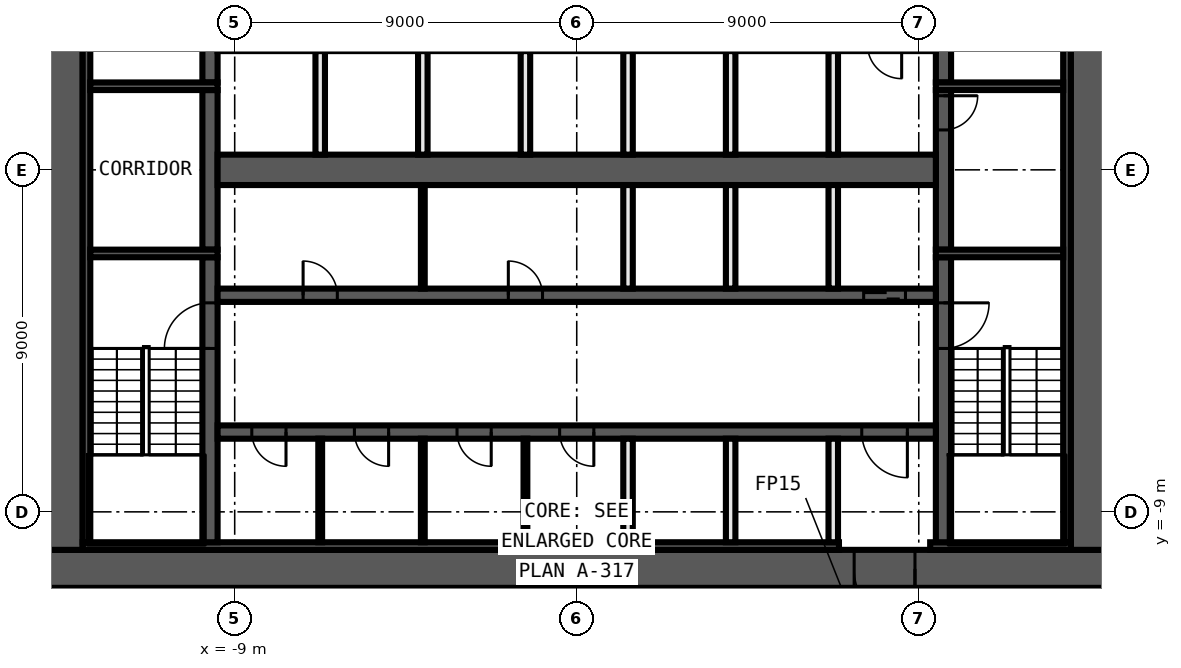
"""IFC4 building model, lengths in metres.
Left out: names, types, materials, properties, quantities, classifications, styles, units other than length and angle.
Written with IfcOpenShell. Run it as: python <this file> out.ifc"""

import sys

from ifc_helpers import new_model, si_unit, direction, frame, frame_2d, origin, place, context, subcontext, project, spatial, rectangle, extrude, element, fill, save


model = new_model("IFC4")
c1 = context("Model", 3, precision=1e-05, world=origin(), true_north=direction((0.0, 1.0)))
c2 = subcontext(c1, "Body", "Model", "MODEL_VIEW")
j1 = project(units=[si_unit("LENGTHUNIT", "METRE"), si_unit("PLANEANGLEUNIT", "RADIAN")], contexts=[c1])
p1 = place(None, origin())
s1 = spatial("IfcSite", under=j1, at=p1, CompositionType="ELEMENT")
p2 = place(p1, origin())
s2 = spatial("IfcBuilding", under=s1, at=p2, CompositionType="ELEMENT")
p3 = place(p2, frame((0.0, 0.0, 124.8)))
s3 = spatial("IfcBuildingStorey", under=s2, at=p3, CompositionType="ELEMENT", Elevation=124.8)
p4 = place(p3, frame((14.0, -10.5, 0.0), z_axis=(0.0, 0.0, 1.0), x_axis=(-1.0, 0.0, 0.0)))
e1 = element("IfcWall", 1, at=p4, inside=s3, PredefinedType="SHEAR", context=c2, shape_type="SweptSolid", body=[
    extrude(rectangle(XDim=28.0, YDim=1.0, at=frame_2d((14.0, 0.0))), origin(), (0.0, 0.0, 1.0), 3.3),
])
p5 = place(p4, frame((5.1, 0.0, 0.0)))
e2 = element("IfcOpeningElement", 2, at=p5, cuts=e1, PredefinedType="OPENING", context=c2, shape_type="SweptSolid", body=[
    extrude(rectangle(XDim=1.6, YDim=2.1, at=frame_2d((0.8, 1.05))), frame((0.0, 0.51, 0.0), z_axis=(0.0, -1.0, 0.0), x_axis=(1.0, 0.0, 0.0)), (0.0, 0.0, 1.0), 1.02),
])
for number, where, z_axis, x_axis in (
    (3, (13.5, 10.0, 0.0), (0.0, 0.0, 1.0), (0.0, -1.0, 0.0)),
    (4, (-13.5, -10.0, 0.0), (0.0, 0.0, 1.0), (0.0, 1.0, 0.0)),
):
    element("IfcWall", number, at=place(p3, frame(where, z_axis=z_axis, x_axis=x_axis)), inside=s3, PredefinedType="SHEAR", context=c2, shape_type="SweptSolid", body=[
        extrude(rectangle(XDim=20.0, YDim=1.0, at=frame_2d((10.0, 0.0))), origin(), (0.0, 0.0, 1.0), 3.3),
    ])
p6 = place(p3, frame((13.0, -9.9, 0.0), z_axis=(0.0, 0.0, 1.0), x_axis=(-1.0, 0.0, 0.0)))
e5 = element("IfcWall", 5, at=p6, inside=s3, PredefinedType="SHEAR", context=c2, shape_type="SweptSolid", body=[
    extrude(rectangle(XDim=3.7, YDim=0.2, at=frame_2d((1.85, 0.0))), origin(), (0.0, 0.0, 1.0), 3.3),
])
p7 = place(p3, frame((6.9, -9.9, 0.0), z_axis=(0.0, 0.0, 1.0), x_axis=(-1.0, 0.0, 0.0)))
e6 = element("IfcWall", 6, at=p7, inside=s3, PredefinedType="SHEAR", context=c2, shape_type="SweptSolid", body=[
    extrude(rectangle(XDim=19.9, YDim=0.2, at=frame_2d((9.95, 0.0))), origin(), (0.0, 0.0, 1.0), 3.3),
])
for number, where, z_axis, x_axis in (
    (7, (12.9, 9.8, 0.0), (0.0, 0.0, 1.0), (0.0, -1.0, 0.0)),
    (8, (-12.9, -9.8, 0.0), (0.0, 0.0, 1.0), (0.0, 1.0, 0.0)),
):
    element("IfcWall", number, at=place(p3, frame(where, z_axis=z_axis, x_axis=x_axis)), inside=s3, PredefinedType="SHEAR", context=c2, shape_type="SweptSolid", body=[
        extrude(rectangle(XDim=19.6, YDim=0.2, at=frame_2d((9.8, 0.0))), origin(), (0.0, 0.0, 1.0), 3.3),
    ])
p8 = place(p3, frame((9.65, -2.3, 0.0), z_axis=(0.0, 0.0, 1.0), x_axis=(0.0, -1.0, 0.0)))
e9 = element("IfcWall", 9, at=p8, inside=s3, PredefinedType="SHEAR", context=c2, shape_type="SweptSolid", body=[
    extrude(rectangle(XDim=7.5, YDim=0.4, at=frame_2d((3.75, 0.0))), origin(), (0.0, 0.0, 1.0), 3.3),
])
p9 = place(p8, frame((1.2, 0.0, 0.0)))
e10 = element("IfcOpeningElement", 10, at=p9, cuts=e9, PredefinedType="OPENING", context=c2, shape_type="SweptSolid", body=[
    extrude(rectangle(XDim=1.2, YDim=2.1, at=frame_2d((0.6, 1.05))), frame((0.0, 0.21, 0.0), z_axis=(0.0, -1.0, 0.0), x_axis=(1.0, 0.0, 0.0)), (0.0, 0.0, 1.0), 0.42),
])
p10 = place(p3, frame((9.65, 2.1, 0.0), z_axis=(0.0, 0.0, 1.0), x_axis=(0.0, -1.0, 0.0)))
e11 = element("IfcWall", 11, at=p10, inside=s3, PredefinedType="SHEAR", context=c2, shape_type="SweptSolid", body=[
    extrude(rectangle(XDim=4.2, YDim=0.4, at=frame_2d((2.1, 0.0))), origin(), (0.0, 0.0, 1.0), 3.3),
])
p11 = place(p10, frame((0.15, 0.0, 0.0)))
e12 = element("IfcOpeningElement", 12, at=p11, cuts=e11, PredefinedType="OPENING", context=c2, shape_type="SweptSolid", body=[
    extrude(rectangle(XDim=0.9, YDim=2.1, at=frame_2d((0.45, 1.05))), frame((0.0, 0.21, 0.0), z_axis=(0.0, -1.0, 0.0), x_axis=(1.0, 0.0, 0.0)), (0.0, 0.0, 1.0), 0.42),
])
p12 = place(p3, frame((9.65, 9.8, 0.0), z_axis=(0.0, 0.0, 1.0), x_axis=(0.0, -1.0, 0.0)))
e13 = element("IfcWall", 13, at=p12, inside=s3, PredefinedType="SHEAR", context=c2, shape_type="SweptSolid", body=[
    extrude(rectangle(XDim=7.5, YDim=0.4, at=frame_2d((3.75, 0.0))), origin(), (0.0, 0.0, 1.0), 3.3),
])
p13 = place(p12, frame((5.1, 0.0, 0.0)))
e14 = element("IfcOpeningElement", 14, at=p13, cuts=e13, PredefinedType="OPENING", context=c2, shape_type="SweptSolid", body=[
    extrude(rectangle(XDim=1.2, YDim=2.1, at=frame_2d((0.6, 1.05))), frame((0.0, 0.21, 0.0), z_axis=(0.0, -1.0, 0.0), x_axis=(1.0, 0.0, 0.0)), (0.0, 0.0, 1.0), 0.42),
])
p14 = place(p3, frame((-9.65, -9.8, 0.0), z_axis=(0.0, 0.0, 1.0), x_axis=(0.0, 1.0, 0.0)))
e15 = element("IfcWall", 15, at=p14, inside=s3, PredefinedType="SHEAR", context=c2, shape_type="SweptSolid", body=[
    extrude(rectangle(XDim=7.5, YDim=0.4, at=frame_2d((3.75, 0.0))), origin(), (0.0, 0.0, 1.0), 3.3),
])
p15 = place(p14, frame((5.1, 0.0, 0.0)))
e16 = element("IfcOpeningElement", 16, at=p15, cuts=e15, PredefinedType="OPENING", context=c2, shape_type="SweptSolid", body=[
    extrude(rectangle(XDim=1.2, YDim=2.1, at=frame_2d((0.6, 1.05))), frame((0.0, 0.21, 0.0), z_axis=(0.0, -1.0, 0.0), x_axis=(1.0, 0.0, 0.0)), (0.0, 0.0, 1.0), 0.42),
])
p16 = place(p3, frame((-9.65, -2.1, 0.0), z_axis=(0.0, 0.0, 1.0), x_axis=(0.0, 1.0, 0.0)))
e17 = element("IfcWall", 17, at=p16, inside=s3, PredefinedType="SHEAR", context=c2, shape_type="SweptSolid", body=[
    extrude(rectangle(XDim=4.2, YDim=0.4, at=frame_2d((2.1, 0.0))), origin(), (0.0, 0.0, 1.0), 3.3),
])
p17 = place(p3, frame((-9.65, 2.3, 0.0), z_axis=(0.0, 0.0, 1.0), x_axis=(0.0, 1.0, 0.0)))
e18 = element("IfcWall", 18, at=p17, inside=s3, PredefinedType="SHEAR", context=c2, shape_type="SweptSolid", body=[
    extrude(rectangle(XDim=7.5, YDim=0.4, at=frame_2d((3.75, 0.0))), origin(), (0.0, 0.0, 1.0), 3.3),
])
p18 = place(p17, frame((1.2, 0.0, 0.0)))
e19 = element("IfcOpeningElement", 19, at=p18, cuts=e18, PredefinedType="OPENING", context=c2, shape_type="SweptSolid", body=[
    extrude(rectangle(XDim=1.2, YDim=2.1, at=frame_2d((0.6, 1.05))), frame((0.0, 0.21, 0.0), z_axis=(0.0, -1.0, 0.0), x_axis=(1.0, 0.0, 0.0)), (0.0, 0.0, 1.0), 0.42),
])
for number, where, z_axis, x_axis in (
    (20, (9.45, 2.2, 0.0), (0.0, 0.0, 1.0), (1.0, 0.0, 0.0)),
    (21, (-9.45, 2.2, 0.0), (0.0, 0.0, 1.0), (-1.0, 0.0, 0.0)),
    (22, (9.45, -2.2, 0.0), (0.0, 0.0, 1.0), (1.0, 0.0, 0.0)),
    (23, (-9.45, -2.2, 0.0), (0.0, 0.0, 1.0), (-1.0, 0.0, 0.0)),
):
    element("IfcWall", number, at=place(p3, frame(where, z_axis=z_axis, x_axis=x_axis)), inside=s3, PredefinedType="SHEAR", context=c2, shape_type="SweptSolid", body=[
        extrude(rectangle(XDim=3.35, YDim=0.2, at=frame_2d((1.675, 0.0))), origin(), (0.0, 0.0, 1.0), 3.3),
    ])
p19 = place(p3, frame((-9.45, -3.3, 0.0), z_axis=(0.0, 0.0, 1.0), x_axis=(1.0, 0.0, 0.0)))
e24 = element("IfcWall", 24, at=p19, inside=s3, PredefinedType="SHEAR", context=c2, shape_type="SweptSolid", body=[
    extrude(rectangle(XDim=18.9, YDim=0.35, at=frame_2d((9.45, 0.0))), origin(), (0.0, 0.0, 1.0), 3.3),
])
p20 = place(p19, frame((17.0, 0.0, 0.0)))
e25 = element("IfcOpeningElement", 25, at=p20, cuts=e24, PredefinedType="OPENING", context=c2, shape_type="SweptSolid", body=[
    extrude(rectangle(XDim=1.1, YDim=2.1, at=frame_2d((0.55, 1.05))), frame((0.0, 0.185, 0.0), z_axis=(0.0, -1.0, 0.0), x_axis=(1.0, 0.0, 0.0)), (0.0, 0.0, 1.0), 0.37),
])
p21 = place(p19, frame((2.25, 0.0, 0.0)))
e26 = element("IfcOpeningElement", 26, at=p21, cuts=e24, PredefinedType="OPENING", context=c2, shape_type="SweptSolid", body=[
    extrude(rectangle(XDim=0.9, YDim=2.1, at=frame_2d((0.45, 1.05))), frame((0.0, 0.185, 0.0), z_axis=(0.0, -1.0, 0.0), x_axis=(1.0, 0.0, 0.0)), (0.0, 0.0, 1.0), 0.37),
])
p22 = place(p19, frame((7.65, 0.0, 0.0)))
e27 = element("IfcOpeningElement", 27, at=p22, cuts=e24, PredefinedType="OPENING", context=c2, shape_type="SweptSolid", body=[
    extrude(rectangle(XDim=0.9, YDim=2.1, at=frame_2d((0.45, 1.05))), frame((0.0, 0.185, 0.0), z_axis=(0.0, -1.0, 0.0), x_axis=(1.0, 0.0, 0.0)), (0.0, 0.0, 1.0), 0.37),
])
p23 = place(p3, frame((9.45, -6.9, 0.0), z_axis=(0.0, 0.0, 1.0), x_axis=(-1.0, 0.0, 0.0)))
e28 = element("IfcWall", 28, at=p23, inside=s3, PredefinedType="SHEAR", context=c2, shape_type="SweptSolid", body=[
    extrude(rectangle(XDim=18.9, YDim=0.35, at=frame_2d((9.45, 0.0))), origin(), (0.0, 0.0, 1.0), 3.3),
])
p24 = place(p23, frame((0.75, 0.0, 0.0)))
e29 = element("IfcOpeningElement", 29, at=p24, cuts=e28, PredefinedType="OPENING", context=c2, shape_type="SweptSolid", body=[
    extrude(rectangle(XDim=1.2, YDim=2.1, at=frame_2d((0.6, 1.05))), frame((0.0, 0.185, 0.0), z_axis=(0.0, -1.0, 0.0), x_axis=(1.0, 0.0, 0.0)), (0.0, 0.0, 1.0), 0.37),
])
p25 = place(p23, frame((17.1, 0.0, 0.0)))
e30 = element("IfcOpeningElement", 30, at=p25, cuts=e28, PredefinedType="OPENING", context=c2, shape_type="SweptSolid", body=[
    extrude(rectangle(XDim=0.9, YDim=2.1, at=frame_2d((0.45, 1.05))), frame((0.0, 0.185, 0.0), z_axis=(0.0, -1.0, 0.0), x_axis=(1.0, 0.0, 0.0)), (0.0, 0.0, 1.0), 0.37),
])
p26 = place(p23, frame((14.4, 0.0, 0.0)))
e31 = element("IfcOpeningElement", 31, at=p26, cuts=e28, PredefinedType="OPENING", context=c2, shape_type="SweptSolid", body=[
    extrude(rectangle(XDim=0.9, YDim=2.1, at=frame_2d((0.45, 1.05))), frame((0.0, 0.185, 0.0), z_axis=(0.0, -1.0, 0.0), x_axis=(1.0, 0.0, 0.0)), (0.0, 0.0, 1.0), 0.37),
])
p27 = place(p23, frame((11.7, 0.0, 0.0)))
e32 = element("IfcOpeningElement", 32, at=p27, cuts=e28, PredefinedType="OPENING", context=c2, shape_type="SweptSolid", body=[
    extrude(rectangle(XDim=0.9, YDim=2.1, at=frame_2d((0.45, 1.05))), frame((0.0, 0.185, 0.0), z_axis=(0.0, -1.0, 0.0), x_axis=(1.0, 0.0, 0.0)), (0.0, 0.0, 1.0), 0.37),
])
p28 = place(p23, frame((9.0, 0.0, 0.0)))
e33 = element("IfcOpeningElement", 33, at=p28, cuts=e28, PredefinedType="OPENING", context=c2, shape_type="SweptSolid", body=[
    extrude(rectangle(XDim=0.9, YDim=2.1, at=frame_2d((0.45, 1.05))), frame((0.0, 0.185, 0.0), z_axis=(0.0, -1.0, 0.0), x_axis=(1.0, 0.0, 0.0)), (0.0, 0.0, 1.0), 0.37),
])
p29 = place(p3, frame((-9.45, 0.0, 0.0), z_axis=(0.0, 0.0, 1.0), x_axis=(1.0, 0.0, 0.0)))
e34 = element("IfcWall", 34, at=p29, inside=s3, PredefinedType="SHEAR", context=c2, shape_type="SweptSolid", body=[
    extrude(rectangle(XDim=18.9, YDim=0.8, at=frame_2d((9.45, 0.0))), origin(), (0.0, 0.0, 1.0), 3.3),
])
for number, where, z_axis, x_axis in (
    (35, (6.75, -9.8, 0.0), (0.0, 0.0, 1.0), (0.0, 1.0, 0.0)),
    (36, (6.75, -3.125, 0.0), (0.0, 0.0, 1.0), (0.0, 1.0, 0.0)),
    (37, (6.75, 0.4, 0.0), (0.0, 0.0, 1.0), (0.0, 1.0, 0.0)),
    (38, (4.05, -9.8, 0.0), (0.0, 0.0, 1.0), (0.0, 1.0, 0.0)),
    (39, (4.05, -3.125, 0.0), (0.0, 0.0, 1.0), (0.0, 1.0, 0.0)),
    (40, (4.05, 0.4, 0.0), (0.0, 0.0, 1.0), (0.0, 1.0, 0.0)),
    (41, (1.35, -9.8, 0.0), (0.0, 0.0, 1.0), (0.0, 1.0, 0.0)),
    (42, (1.35, -3.125, 0.0), (0.0, 0.0, 1.0), (0.0, 1.0, 0.0)),
    (43, (1.35, 0.4, 0.0), (0.0, 0.0, 1.0), (0.0, 1.0, 0.0)),
):
    element("IfcWall", number, at=place(p3, frame(where, z_axis=z_axis, x_axis=x_axis)), inside=s3, PredefinedType="SOLIDWALL", context=c2, shape_type="SweptSolid", body=[
        extrude(rectangle(XDim=2.725, YDim=0.25, at=frame_2d((1.363, 0.0))), origin(), (0.0, 0.0, 1.0), 3.3),
    ])
p30 = place(p3, frame((-1.35, -9.8, 0.0), z_axis=(0.0, 0.0, 1.0), x_axis=(0.0, 1.0, 0.0)))
e44 = element("IfcWall", 44, at=p30, inside=s3, PredefinedType="PARTITIONING", context=c2, shape_type="SweptSolid", body=[
    extrude(rectangle(XDim=2.725, YDim=0.1, at=frame_2d((1.363, 0.0))), origin(), (0.0, 0.0, 1.0), 3.3),
])
p31 = place(p3, frame((-1.35, 0.4, 0.0), z_axis=(0.0, 0.0, 1.0), x_axis=(0.0, 1.0, 0.0)))
e45 = element("IfcWall", 45, at=p31, inside=s3, PredefinedType="SOLIDWALL", context=c2, shape_type="SweptSolid", body=[
    extrude(rectangle(XDim=2.725, YDim=0.25, at=frame_2d((1.363, 0.0))), origin(), (0.0, 0.0, 1.0), 3.3),
])
for number, where, z_axis, x_axis in (
    (46, (-4.05, -9.8, 0.0), (0.0, 0.0, 1.0), (0.0, 1.0, 0.0)),
    (47, (-4.05, -3.125, 0.0), (0.0, 0.0, 1.0), (0.0, 1.0, 0.0)),
):
    element("IfcWall", number, at=place(p3, frame(where, z_axis=z_axis, x_axis=x_axis)), inside=s3, PredefinedType="PARTITIONING", context=c2, shape_type="SweptSolid", body=[
        extrude(rectangle(XDim=2.725, YDim=0.1, at=frame_2d((1.363, 0.0))), origin(), (0.0, 0.0, 1.0), 3.3),
    ])
p32 = place(p3, frame((-4.05, 0.4, 0.0), z_axis=(0.0, 0.0, 1.0), x_axis=(0.0, 1.0, 0.0)))
e48 = element("IfcWall", 48, at=p32, inside=s3, PredefinedType="SOLIDWALL", context=c2, shape_type="SweptSolid", body=[
    extrude(rectangle(XDim=2.725, YDim=0.25, at=frame_2d((1.363, 0.0))), origin(), (0.0, 0.0, 1.0), 3.3),
])
p33 = place(p3, frame((-6.75, -9.8, 0.0), z_axis=(0.0, 0.0, 1.0), x_axis=(0.0, 1.0, 0.0)))
e49 = element("IfcWall", 49, at=p33, inside=s3, PredefinedType="PARTITIONING", context=c2, shape_type="SweptSolid", body=[
    extrude(rectangle(XDim=2.725, YDim=0.1, at=frame_2d((1.363, 0.0))), origin(), (0.0, 0.0, 1.0), 3.3),
])
p34 = place(p3, frame((-6.75, 0.4, 0.0), z_axis=(0.0, 0.0, 1.0), x_axis=(0.0, 1.0, 0.0)))
e50 = element("IfcWall", 50, at=p34, inside=s3, PredefinedType="SOLIDWALL", context=c2, shape_type="SweptSolid", body=[
    extrude(rectangle(XDim=2.725, YDim=0.25, at=frame_2d((1.363, 0.0))), origin(), (0.0, 0.0, 1.0), 3.3),
])
p35 = place(p11, origin())
e51 = element("IfcDoor", 51, at=p35, inside=s3, OperationType="SINGLE_SWING_RIGHT", PredefinedType="DOOR", context=c2, shape_type="SweptSolid", body=[
    extrude(rectangle(XDim=0.9, YDim=2.1, at=frame_2d((0.45, 1.05))), frame((0.0, 0.025, 0.0), z_axis=(0.0, -1.0, 0.0), x_axis=(1.0, 0.0, 0.0)), (0.0, 0.0, 1.0), 0.05),
])
fill(e12, e51)
p36 = place(p20, origin())
e52 = element("IfcDoor", 52, at=p36, inside=s3, OperationType="DOUBLE_DOOR_SLIDING", PredefinedType="DOOR", context=c2, shape_type="SweptSolid", body=[
    extrude(rectangle(XDim=1.1, YDim=2.1, at=frame_2d((0.55, 1.05))), frame((0.0, 0.025, 0.0), z_axis=(0.0, -1.0, 0.0), x_axis=(1.0, 0.0, 0.0)), (0.0, 0.0, 1.0), 0.05),
])
fill(e25, e52)
p37 = place(p5, origin())
e53 = element("IfcDoor", 53, at=p37, inside=s3, OperationType="DOUBLE_DOOR_SINGLE_SWING", PredefinedType="DOOR", context=c2, shape_type="SweptSolid", body=[
    extrude(rectangle(XDim=1.6, YDim=2.1, at=frame_2d((0.8, 1.05))), frame((0.0, 0.025, 0.0), z_axis=(0.0, -1.0, 0.0), x_axis=(1.0, 0.0, 0.0)), (0.0, 0.0, 1.0), 0.05),
])
fill(e2, e53)
p38 = place(p24, origin())
e54 = element("IfcDoor", 54, at=p38, inside=s3, OperationType="SINGLE_SWING_LEFT", PredefinedType="DOOR", context=c2, shape_type="SweptSolid", body=[
    extrude(rectangle(XDim=1.2, YDim=2.1, at=frame_2d((0.6, 1.05))), frame((0.0, 0.025, 0.0), z_axis=(0.0, -1.0, 0.0), x_axis=(1.0, 0.0, 0.0)), (0.0, 0.0, 1.0), 0.05),
])
fill(e29, e54)
p39 = place(p21, origin())
e55 = element("IfcDoor", 55, at=p39, inside=s3, OperationType="SINGLE_SWING_RIGHT", PredefinedType="DOOR", context=c2, shape_type="SweptSolid", body=[
    extrude(rectangle(XDim=0.9, YDim=2.1, at=frame_2d((0.45, 1.05))), frame((0.0, 0.025, 0.0), z_axis=(0.0, -1.0, 0.0), x_axis=(1.0, 0.0, 0.0)), (0.0, 0.0, 1.0), 0.05),
])
fill(e26, e55)
p40 = place(p22, origin())
e56 = element("IfcDoor", 56, at=p40, inside=s3, OperationType="SINGLE_SWING_LEFT", PredefinedType="DOOR", context=c2, shape_type="SweptSolid", body=[
    extrude(rectangle(XDim=0.9, YDim=2.1, at=frame_2d((0.45, 1.05))), frame((0.0, 0.025, 0.0), z_axis=(0.0, -1.0, 0.0), x_axis=(1.0, 0.0, 0.0)), (0.0, 0.0, 1.0), 0.05),
])
fill(e27, e56)
p41 = place(p25, origin())
e57 = element("IfcDoor", 57, at=p41, inside=s3, OperationType="SINGLE_SWING_RIGHT", PredefinedType="DOOR", context=c2, shape_type="SweptSolid", body=[
    extrude(rectangle(XDim=0.9, YDim=2.1, at=frame_2d((0.45, 1.05))), frame((0.0, 0.025, 0.0), z_axis=(0.0, -1.0, 0.0), x_axis=(1.0, 0.0, 0.0)), (0.0, 0.0, 1.0), 0.05),
])
fill(e30, e57)
p42 = place(p26, origin())
e58 = element("IfcDoor", 58, at=p42, inside=s3, OperationType="SINGLE_SWING_LEFT", PredefinedType="DOOR", context=c2, shape_type="SweptSolid", body=[
    extrude(rectangle(XDim=0.9, YDim=2.1, at=frame_2d((0.45, 1.05))), frame((0.0, 0.025, 0.0), z_axis=(0.0, -1.0, 0.0), x_axis=(1.0, 0.0, 0.0)), (0.0, 0.0, 1.0), 0.05),
])
fill(e31, e58)
p43 = place(p27, origin())
e59 = element("IfcDoor", 59, at=p43, inside=s3, OperationType="SINGLE_SWING_RIGHT", PredefinedType="DOOR", context=c2, shape_type="SweptSolid", body=[
    extrude(rectangle(XDim=0.9, YDim=2.1, at=frame_2d((0.45, 1.05))), frame((0.0, 0.025, 0.0), z_axis=(0.0, -1.0, 0.0), x_axis=(1.0, 0.0, 0.0)), (0.0, 0.0, 1.0), 0.05),
])
fill(e32, e59)
p44 = place(p28, origin())
e60 = element("IfcDoor", 60, at=p44, inside=s3, OperationType="SINGLE_SWING_LEFT", PredefinedType="DOOR", context=c2, shape_type="SweptSolid", body=[
    extrude(rectangle(XDim=0.9, YDim=2.1, at=frame_2d((0.45, 1.05))), frame((0.0, 0.025, 0.0), z_axis=(0.0, -1.0, 0.0), x_axis=(1.0, 0.0, 0.0)), (0.0, 0.0, 1.0), 0.05),
])
fill(e33, e60)
p45 = place(p9, origin())
e61 = element("IfcDoor", 61, at=p45, inside=s3, OperationType="SINGLE_SWING_RIGHT", PredefinedType="DOOR", context=c2, shape_type="SweptSolid", body=[
    extrude(rectangle(XDim=1.2, YDim=2.1, at=frame_2d((0.6, 1.05))), frame((0.0, 0.025, 0.0), z_axis=(0.0, -1.0, 0.0), x_axis=(1.0, 0.0, 0.0)), (0.0, 0.0, 1.0), 0.05),
])
fill(e10, e61)
p46 = place(p15, origin())
e62 = element("IfcDoor", 62, at=p46, inside=s3, OperationType="SINGLE_SWING_LEFT", PredefinedType="DOOR", context=c2, shape_type="SweptSolid", body=[
    extrude(rectangle(XDim=1.2, YDim=2.1, at=frame_2d((0.6, 1.05))), frame((0.0, 0.025, 0.0), z_axis=(0.0, -1.0, 0.0), x_axis=(1.0, 0.0, 0.0)), (0.0, 0.0, 1.0), 0.05),
])
fill(e16, e62)
save(model, sys.argv[1])
